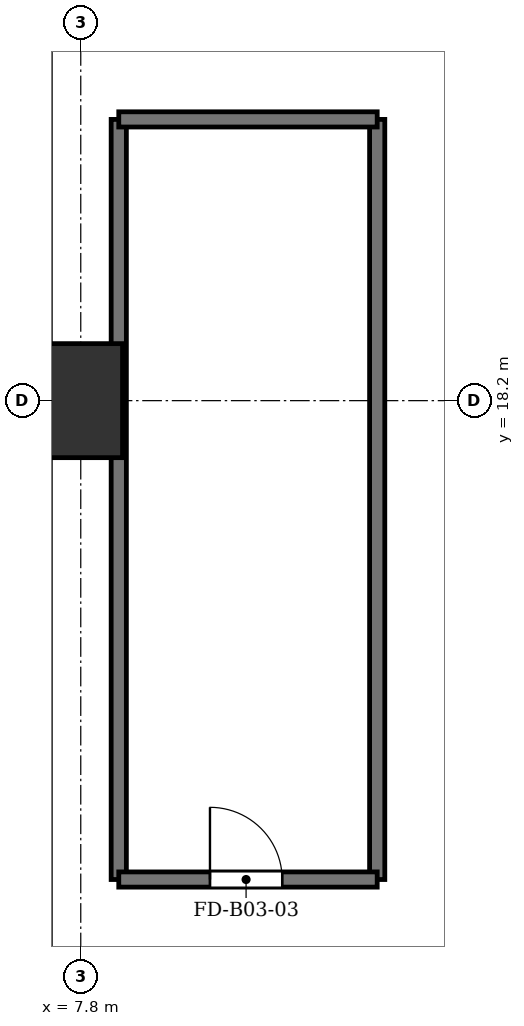
"""IFC4 building model, lengths in metres.
Left out: names, types, materials, properties, quantities, classifications, styles, units other than length and angle.
Written with IfcOpenShell. Run it as: python <this file> out.ifc"""

import sys

from ifc_helpers import new_model, si_unit, direction, frame, frame_2d, origin, origin_2d, place, context, subcontext, project, spatial, rectangle, extrude, source, transform, mapped, element, fill, save


model = new_model("IFC4")
c1 = context("Model", 3, precision=1e-05, world=origin(), true_north=direction((0.0, 1.0)))
c2 = subcontext(c1, "Body", "Model", "MODEL_VIEW")
j1 = project(units=[si_unit("LENGTHUNIT", "METRE"), si_unit("PLANEANGLEUNIT", "RADIAN")], contexts=[c1])
p1 = place(None, origin())
s1 = spatial("IfcSite", under=j1, at=p1, CompositionType="ELEMENT")
p2 = place(p1, origin())
s2 = spatial("IfcBuilding", under=s1, at=p2, CompositionType="ELEMENT")
p3 = place(p2, frame((0.0, 0.0, -13.2)))
s3 = spatial("IfcBuildingStorey", under=s2, at=p3, CompositionType="ELEMENT", Elevation=-13.2)
m1 = source(origin(), c2, "Body", "SweptSolid", [
    extrude(rectangle(XDim=1.5, YDim=1.5, at=origin_2d()), origin(), (0.0, 0.0, 1.0), 4.6),
])
p4 = place(p3, frame((7.6, 18.2, 0.0), z_axis=(0.0, 0.0, 1.0), x_axis=(1.0, 0.0, 0.0)))
e1 = element("IfcColumn", 1, at=p4, inside=s3, PredefinedType="COLUMN", context=c2, shape_type="MappedRepresentation", body=[
    mapped(m1, transform((0.0, 0.0, 0.0), x_axis=(1.0, 0.0, 0.0), y_axis=(0.0, 1.0, 0.0), z_axis=(0.0, 0.0, 1.0), scale=1.0)),
])
for number, where, z_axis, x_axis in (
    (2, (8.3, 11.9, 0.0), (0.0, 0.0, 1.0), (0.0, 1.0, 0.0)),
    (3, (11.7, 11.9, 0.0), (0.0, 0.0, 1.0), (0.0, 1.0, 0.0)),
):
    element("IfcWall", number, at=place(p3, frame(where, z_axis=z_axis, x_axis=x_axis)), inside=s3, PredefinedType="SHEAR", context=c2, shape_type="SweptSolid", body=[
        extrude(rectangle(XDim=10.0, YDim=0.2, at=frame_2d((5.0, 0.0))), origin(), (0.0, 0.0, 1.0), 4.28),
    ])
p5 = place(p3, frame((8.3, 11.9, 0.0), z_axis=(0.0, 0.0, 1.0), x_axis=(1.0, 0.0, 0.0)))
e4 = element("IfcWall", 4, at=p5, inside=s3, PredefinedType="SHEAR", context=c2, shape_type="SweptSolid", body=[
    extrude(rectangle(XDim=3.4, YDim=0.2, at=frame_2d((1.7, 0.0))), origin(), (0.0, 0.0, 1.0), 4.28),
])
p6 = place(p5, frame((1.2, 0.0, 0.0)))
e5 = element("IfcOpeningElement", 5, at=p6, cuts=e4, PredefinedType="OPENING", context=c2, shape_type="SweptSolid", body=[
    extrude(rectangle(XDim=0.95, YDim=2.15, at=frame_2d((0.475, 1.075))), frame((0.0, 0.11, 0.0), z_axis=(0.0, -1.0, 0.0), x_axis=(1.0, 0.0, 0.0)), (0.0, 0.0, 1.0), 0.22),
])
p7 = place(p3, frame((8.3, 21.9, 0.0), z_axis=(0.0, 0.0, 1.0), x_axis=(1.0, 0.0, 0.0)))
e6 = element("IfcWall", 6, at=p7, inside=s3, PredefinedType="SHEAR", context=c2, shape_type="SweptSolid", body=[
    extrude(rectangle(XDim=3.4, YDim=0.2, at=frame_2d((1.7, 0.0))), origin(), (0.0, 0.0, 1.0), 4.28),
])
m2 = source(origin(), c2, "Body", "SweptSolid", [
    extrude(rectangle(XDim=0.95, YDim=2.15, at=frame_2d((0.475, 1.075))), frame((0.0, 0.025, 0.0), z_axis=(0.0, -1.0, 0.0), x_axis=(1.0, 0.0, 0.0)), (0.0, 0.0, 1.0), 0.05),
])
p8 = place(p6, origin())
e7 = element("IfcDoor", 7, at=p8, inside=s3, OperationType="SINGLE_SWING_LEFT", PredefinedType="DOOR", context=c2, shape_type="MappedRepresentation", body=[
    mapped(m2, transform((0.0, 0.0, 0.0), x_axis=(1.0, 0.0, 0.0), y_axis=(0.0, 1.0, 0.0), z_axis=(0.0, 0.0, 1.0), scale=1.0)),
])
fill(e5, e7)
save(model, sys.argv[1])
